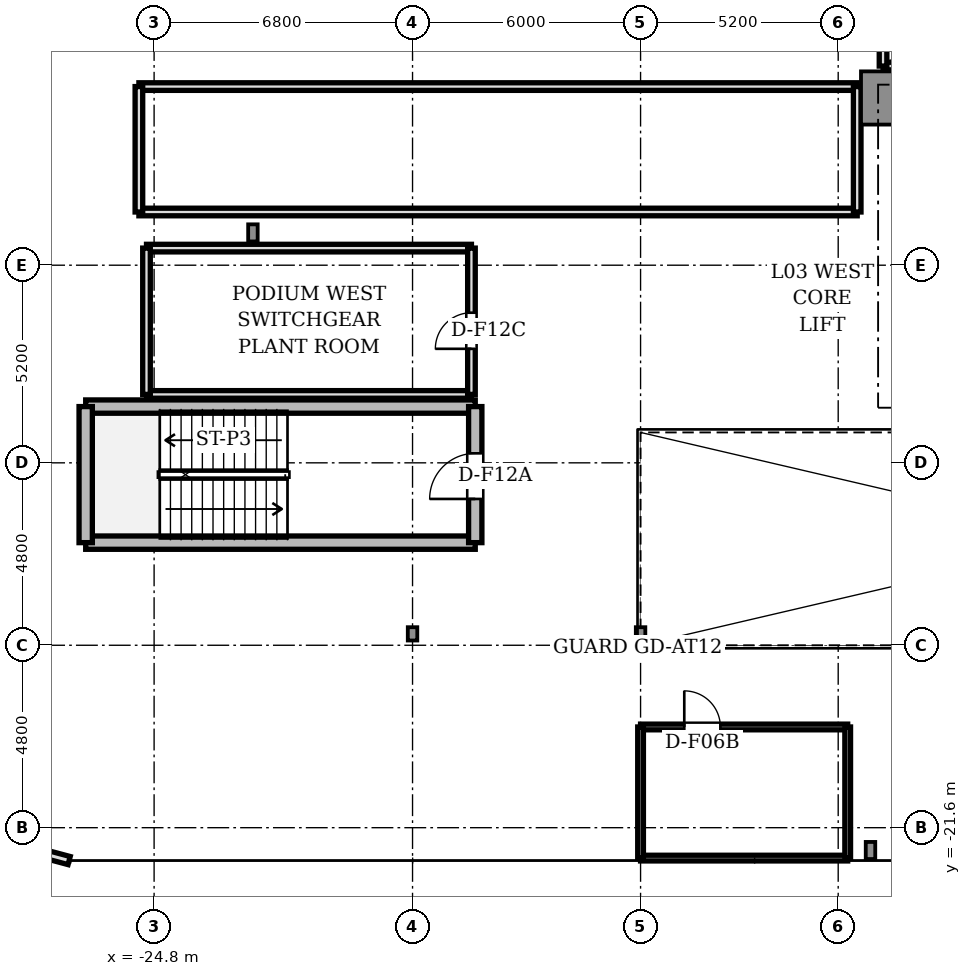
"""IFC4 building model, lengths in metres.
Left out: names, types, materials, properties, quantities, classifications, styles, units other than length and angle.
Written with IfcOpenShell. Run it as: python <this file> out.ifc"""

import sys

from ifc_helpers import new_model, si_unit, direction, frame, frame_2d, origin, origin_2d, place, context, subcontext, project, spatial, rectangle, i_section, extrude, source, transform, mapped, element, fill, save


model = new_model("IFC4")
c1 = context("Model", 3, precision=1e-05, world=origin(), true_north=direction((0.0, 1.0)))
c2 = subcontext(c1, "Body", "Model", "MODEL_VIEW")
j1 = project(units=[si_unit("LENGTHUNIT", "METRE"), si_unit("PLANEANGLEUNIT", "RADIAN")], contexts=[c1])
p1 = place(None, origin())
s1 = spatial("IfcSite", under=j1, at=p1, CompositionType="ELEMENT")
p2 = place(p1, origin())
s2 = spatial("IfcBuilding", under=s1, at=p2, CompositionType="ELEMENT")
p3 = place(p2, frame((0.0, 0.0, 14.1)))
s3 = spatial("IfcBuildingStorey", under=s2, at=p3, CompositionType="ELEMENT", Elevation=14.1)
m1 = source(origin(), c2, "Body", "SweptSolid", [
    extrude(rectangle(XDim=1.4, YDim=1.4, at=origin_2d()), origin(), (0.0, 0.0, 1.0), 4.18),
])
p4 = place(p3, frame((-5.5, -2.4, 0.0), z_axis=(0.0, 0.0, 1.0), x_axis=(1.0, 0.0, 0.0)))
e1 = element("IfcColumn", 1, at=p4, inside=s3, PredefinedType="COLUMN", context=c2, shape_type="MappedRepresentation", body=[
    mapped(m1, transform((0.0, 0.0, 0.0), scale=1.0)),
])
m2 = source(origin(), c2, "Body", "SweptSolid", [
    extrude(i_section(OverallWidth=0.25, OverallDepth=0.45, WebThickness=0.014, FlangeThickness=0.014, FilletRadius=0.015, at=origin_2d()), origin(), (0.0, 0.0, 1.0), 4.18),
])
for number, where, z_axis, x_axis in (
    (2, (-22.2, -5.95, 0.0), (0.0, 0.0, 1.0), (1.0, 0.0, 0.0)),
    (3, (-5.95, -22.2, 0.0), (0.0, 0.0, 1.0), (1.0, 0.0, 0.0)),
):
    element("IfcColumn", number, at=place(p3, frame(where, z_axis=z_axis, x_axis=x_axis)), inside=s3, PredefinedType="COLUMN", context=c2, shape_type="MappedRepresentation", body=[
        mapped(m2, transform((0.0, 0.0, 0.0), scale=1.0)),
    ])
m3 = source(origin(), c2, "Body", "SweptSolid", [
    extrude(i_section(OverallWidth=0.25, OverallDepth=0.35, WebThickness=0.012, FlangeThickness=0.012, FilletRadius=0.012, at=origin_2d()), origin(), (0.0, 0.0, 1.0), 4.18),
])
for number, where, z_axis, x_axis in (
    (4, (-18.0, -16.5, 0.0), (0.0, 0.0, 1.0), (1.0, 0.0, 0.0)),
    (5, (-12.0, -16.5, 0.0), (0.0, 0.0, 1.0), (1.0, 0.0, 0.0)),
):
    element("IfcColumn", number, at=place(p3, frame(where, z_axis=z_axis, x_axis=x_axis)), inside=s3, PredefinedType="COLUMN", context=c2, shape_type="MappedRepresentation", body=[
        mapped(m3, transform((0.0, 0.0, 0.0), scale=1.0)),
    ])
p5 = place(p3, frame((-28.236, -22.144, 0.0), z_axis=(0.0, 0.0, 1.0), x_axis=(0.965937527666, -0.25877537102, 0.0)))
e6 = element("IfcWall", 6, at=p5, inside=s3, PredefinedType="STANDARD", context=c2, shape_type="SweptSolid", body=[
    extrude(rectangle(XDim=1.242, YDim=0.22, at=frame_2d((0.621, 0.0))), origin(), (0.0, 0.0, 1.0), 4.18),
])
p6 = place(p3, frame((-5.62, -1.56, 0.0), z_axis=(0.0, 0.0, 1.0), x_axis=(1.0, 0.0, 0.0)))
e7 = element("IfcWall", 7, at=p6, inside=s3, PredefinedType="SOLIDWALL", context=c2, shape_type="SweptSolid", body=[
    extrude(rectangle(XDim=1.64, YDim=0.2, at=frame_2d((0.82, 0.0))), origin(), (0.0, 0.0, 1.0), 3.73),
])
p7 = place(p3, frame((-5.62, -1.56, 0.0), z_axis=(0.0, 0.0, 1.0), x_axis=(0.0, 1.0, 0.0)))
e8 = element("IfcWall", 8, at=p7, inside=s3, PredefinedType="SOLIDWALL", context=c2, shape_type="SweptSolid", body=[
    extrude(rectangle(XDim=1.56, YDim=0.2, at=frame_2d((0.78, 0.0))), origin(), (0.0, 0.0, 1.0), 3.73),
])
for number, where, z_axis, x_axis in (
    (9, (-26.6, -10.52, 0.0), (0.0, 0.0, 1.0), (1.0, 0.0, 0.0)),
    (10, (-26.6, -14.1, 0.0), (0.0, 0.0, 1.0), (1.0, 0.0, 0.0)),
):
    element("IfcWall", number, at=place(p3, frame(where, z_axis=z_axis, x_axis=x_axis)), inside=s3, PredefinedType="SHEAR", context=c2, shape_type="SweptSolid", body=[
        extrude(rectangle(XDim=10.25, YDim=0.35, at=frame_2d((5.125, 0.0))), origin(), (0.0, 0.0, 1.0), 4.18),
    ])
p8 = place(p3, frame((-26.6, -14.1, 0.0), z_axis=(0.0, 0.0, 1.0), x_axis=(0.0, 1.0, 0.0)))
e11 = element("IfcWall", 11, at=p8, inside=s3, PredefinedType="SHEAR", context=c2, shape_type="SweptSolid", body=[
    extrude(rectangle(XDim=3.58, YDim=0.35, at=frame_2d((1.79, 0.0))), origin(), (0.0, 0.0, 1.0), 4.18),
])
p9 = place(p3, frame((-16.35, -14.1, 0.0), z_axis=(0.0, 0.0, 1.0), x_axis=(0.0, 1.0, 0.0)))
e12 = element("IfcWall", 12, at=p9, inside=s3, PredefinedType="SHEAR", context=c2, shape_type="SweptSolid", body=[
    extrude(rectangle(XDim=3.58, YDim=0.35, at=frame_2d((1.79, 0.0))), origin(), (0.0, 0.0, 1.0), 4.18),
])
p10 = place(p9, frame((1.15, 0.0, 0.0)))
e13 = element("IfcOpeningElement", 13, at=p10, cuts=e12, PredefinedType="OPENING", context=c2, shape_type="SweptSolid", body=[
    extrude(rectangle(XDim=1.2, YDim=2.2, at=frame_2d((0.6, 1.1))), frame((0.0, 0.185, 0.0), z_axis=(0.0, -1.0, 0.0), x_axis=(1.0, 0.0, 0.0)), (0.0, 0.0, 1.0), 0.37),
])
for number, where, z_axis, x_axis in (
    (14, (-25.2, -2.1, 0.0), (0.0, 0.0, 1.0), (1.0, 0.0, 0.0)),
    (15, (-25.2, -5.4, 0.0), (0.0, 0.0, 1.0), (1.0, 0.0, 0.0)),
):
    element("IfcWall", number, at=place(p3, frame(where, z_axis=z_axis, x_axis=x_axis)), inside=s3, PredefinedType="SOLIDWALL", context=c2, shape_type="SweptSolid", body=[
        extrude(rectangle(XDim=18.9, YDim=0.2, at=frame_2d((9.45, 0.0))), origin(), (0.0, 0.0, 1.0), 3.25),
    ])
for number, where, z_axis, x_axis in (
    (16, (-25.2, -5.4, 0.0), (0.0, 0.0, 1.0), (0.0, 1.0, 0.0)),
    (17, (-6.3, -5.4, 0.0), (0.0, 0.0, 1.0), (0.0, 1.0, 0.0)),
):
    element("IfcWall", number, at=place(p3, frame(where, z_axis=z_axis, x_axis=x_axis)), inside=s3, PredefinedType="SOLIDWALL", context=c2, shape_type="SweptSolid", body=[
        extrude(rectangle(XDim=3.3, YDim=0.2, at=frame_2d((1.65, 0.0))), origin(), (0.0, 0.0, 1.0), 3.73),
    ])
p11 = place(p3, frame((-25.0, -6.35, 0.0), z_axis=(0.0, 0.0, 1.0), x_axis=(1.0, 0.0, 0.0)))
e18 = element("IfcWall", 18, at=p11, inside=s3, PredefinedType="SOLIDWALL", context=c2, shape_type="SweptSolid", body=[
    extrude(rectangle(XDim=8.55, YDim=0.2, at=frame_2d((4.275, 0.0))), origin(), (0.0, 0.0, 1.0), 3.25),
])
p12 = place(p3, frame((-25.0, -10.2, 0.0), z_axis=(0.0, 0.0, 1.0), x_axis=(1.0, 0.0, 0.0)))
e19 = element("IfcWall", 19, at=p12, inside=s3, PredefinedType="SOLIDWALL", context=c2, shape_type="SweptSolid", body=[
    extrude(rectangle(XDim=8.55, YDim=0.2, at=frame_2d((4.275, 0.0))), origin(), (0.0, 0.0, 1.0), 3.73),
])
p13 = place(p3, frame((-25.0, -10.2, 0.0), z_axis=(0.0, 0.0, 1.0), x_axis=(0.0, 1.0, 0.0)))
e20 = element("IfcWall", 20, at=p13, inside=s3, PredefinedType="SOLIDWALL", context=c2, shape_type="SweptSolid", body=[
    extrude(rectangle(XDim=3.85, YDim=0.2, at=frame_2d((1.925, 0.0))), origin(), (0.0, 0.0, 1.0), 3.73),
])
p14 = place(p3, frame((-16.45, -10.2, 0.0), z_axis=(0.0, 0.0, 1.0), x_axis=(0.0, 1.0, 0.0)))
e21 = element("IfcWall", 21, at=p14, inside=s3, PredefinedType="SOLIDWALL", context=c2, shape_type="SweptSolid", body=[
    extrude(rectangle(XDim=3.85, YDim=0.2, at=frame_2d((1.925, 0.0))), origin(), (0.0, 0.0, 1.0), 3.73),
])
p15 = place(p14, frame((1.2, 0.0, 0.0)))
e22 = element("IfcOpeningElement", 22, at=p15, cuts=e21, PredefinedType="OPENING", context=c2, shape_type="SweptSolid", body=[
    extrude(rectangle(XDim=0.95, YDim=2.15, at=frame_2d((0.475, 1.075))), frame((0.0, 0.11, 0.0), z_axis=(0.0, -1.0, 0.0), x_axis=(1.0, 0.0, 0.0)), (0.0, 0.0, 1.0), 0.22),
])
p16 = place(p3, frame((-12.0, -18.95, 0.0), z_axis=(0.0, 0.0, 1.0), x_axis=(1.0, 0.0, 0.0)))
e23 = element("IfcWall", 23, at=p16, inside=s3, PredefinedType="PARTITIONING", context=c2, shape_type="SweptSolid", body=[
    extrude(rectangle(XDim=5.45, YDim=0.15, at=frame_2d((2.725, 0.0))), origin(), (0.0, 0.0, 1.0), 3.73),
])
p17 = place(p16, frame((1.15, 0.0, 0.0)))
e24 = element("IfcOpeningElement", 24, at=p17, cuts=e23, PredefinedType="OPENING", context=c2, shape_type="SweptSolid", body=[
    extrude(rectangle(XDim=0.95, YDim=2.15, at=frame_2d((0.475, 1.075))), frame((0.0, 0.085, 0.0), z_axis=(0.0, -1.0, 0.0), x_axis=(1.0, 0.0, 0.0)), (0.0, 0.0, 1.0), 0.17),
])
p18 = place(p3, frame((-12.0, -22.4, 0.0), z_axis=(0.0, 0.0, 1.0), x_axis=(1.0, 0.0, 0.0)))
e25 = element("IfcWall", 25, at=p18, inside=s3, PredefinedType="PARTITIONING", context=c2, shape_type="SweptSolid", body=[
    extrude(rectangle(XDim=5.45, YDim=0.15, at=frame_2d((2.725, 0.0))), origin(), (0.0, 0.0, 1.0), 3.73),
])
for number, where, z_axis, x_axis in (
    (26, (-12.0, -22.4, 0.0), (0.0, 0.0, 1.0), (0.0, 1.0, 0.0)),
    (27, (-6.55, -22.4, 0.0), (0.0, 0.0, 1.0), (0.0, 1.0, 0.0)),
):
    element("IfcWall", number, at=place(p3, frame(where, z_axis=z_axis, x_axis=x_axis)), inside=s3, PredefinedType="PARTITIONING", context=c2, shape_type="SweptSolid", body=[
        extrude(rectangle(XDim=3.45, YDim=0.15, at=frame_2d((1.725, 0.0))), origin(), (0.0, 0.0, 1.0), 3.73),
    ])
m4 = source(origin(), c2, "Body", "SweptSolid", [
    extrude(rectangle(XDim=1.2, YDim=0.05, at=origin_2d()), origin(), (0.0, 0.0, 1.0), 2.2),
])
p19 = place(p10, frame((0.6, 0.0, 0.0)))
e28 = element("IfcDoor", 28, at=p19, inside=s3, OperationType="SINGLE_SWING_LEFT", PredefinedType="DOOR", context=c2, shape_type="MappedRepresentation", body=[
    mapped(m4, transform((0.0, 0.0, 0.0), scale=1.0)),
])
fill(e13, e28)
m5 = source(origin(), c2, "Body", "SweptSolid", [
    extrude(rectangle(XDim=0.95, YDim=0.05, at=origin_2d()), origin(), (0.0, 0.0, 1.0), 2.15),
])
p20 = place(p15, frame((0.475, 0.0, 0.0)))
e29 = element("IfcDoor", 29, at=p20, inside=s3, OperationType="SINGLE_SWING_LEFT", PredefinedType="DOOR", context=c2, shape_type="MappedRepresentation", body=[
    mapped(m5, transform((0.0, 0.0, 0.0), scale=1.0)),
])
fill(e22, e29)
p21 = place(p17, frame((0.475, 0.0, 0.0)))
e30 = element("IfcDoor", 30, at=p21, inside=s3, OperationType="SINGLE_SWING_LEFT", PredefinedType="DOOR", context=c2, shape_type="MappedRepresentation", body=[
    mapped(m5, transform((0.0, 0.0, 0.0), scale=1.0)),
])
fill(e24, e30)
save(model, sys.argv[1])
